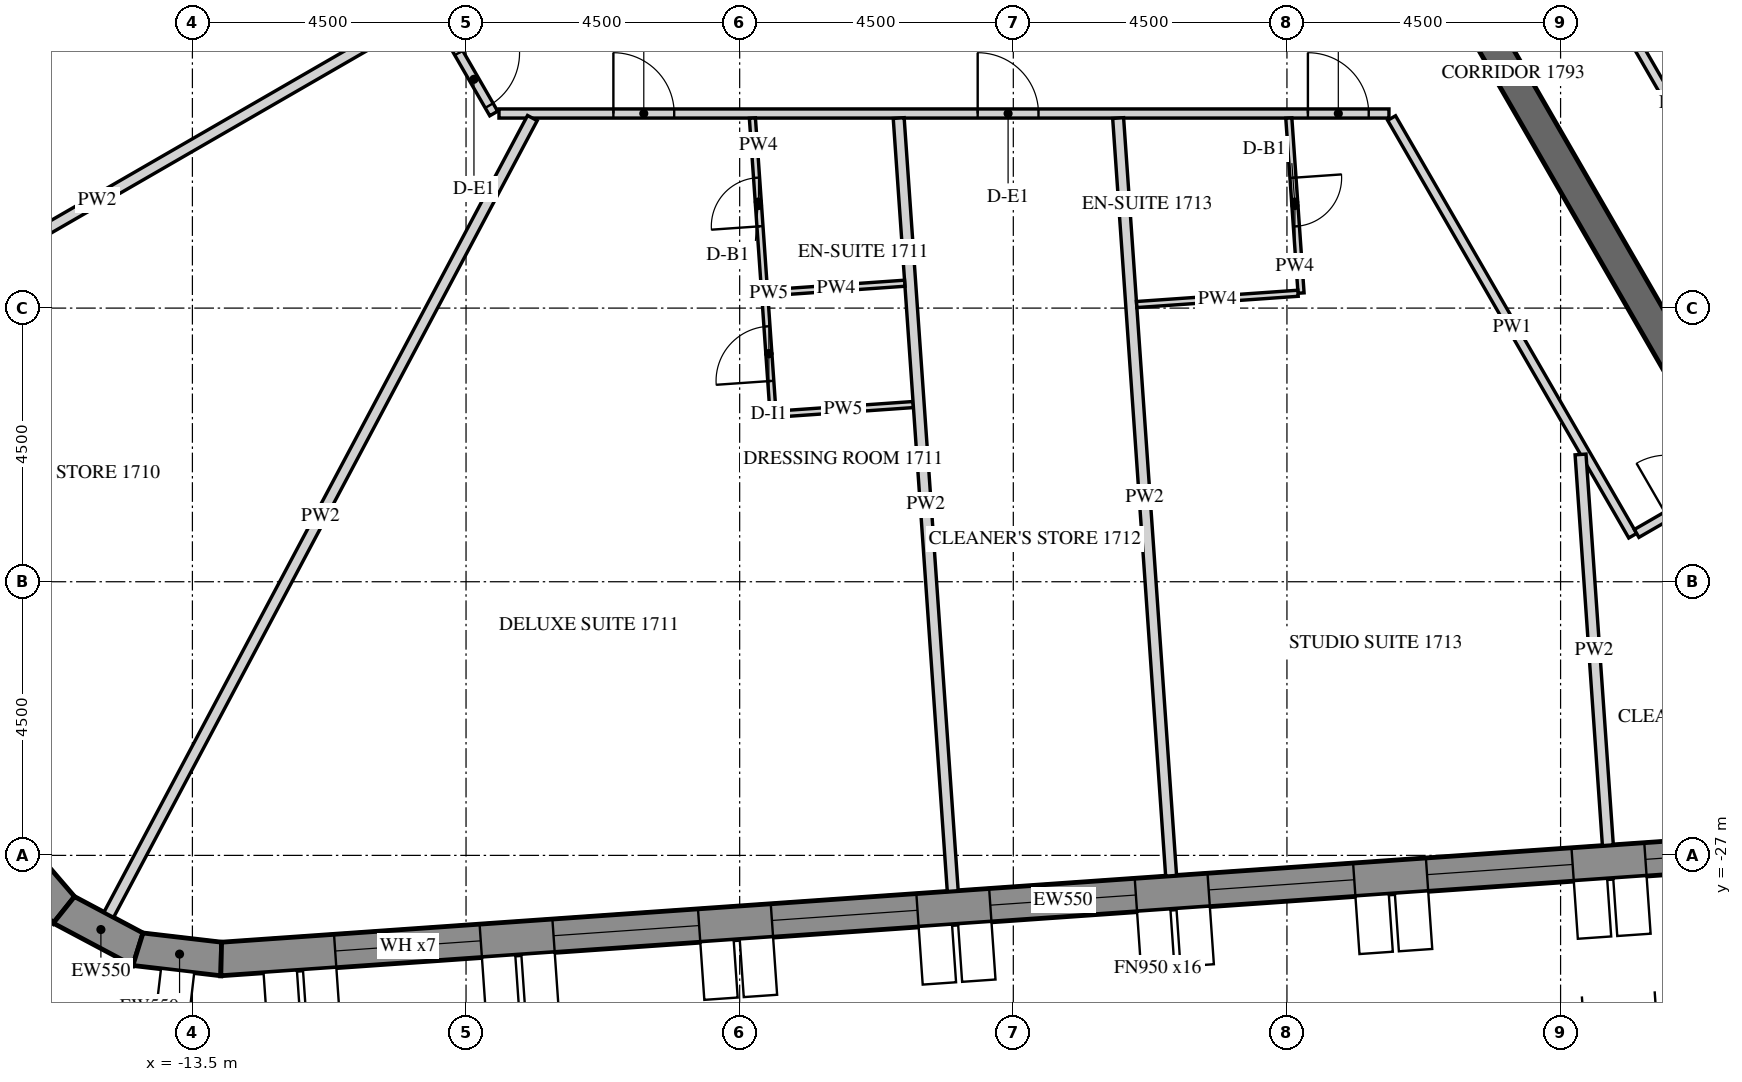
"""IFC4 building model, lengths in metres.
Left out: names, types, materials, properties, quantities, classifications, styles, units other than length and angle.
Written with IfcOpenShell. Run it as: python <this file> out.ifc"""

import sys

from ifc_helpers import new_model, si_unit, direction, frame, frame_2d, origin, place, context, subcontext, project, spatial, polyline, rectangle, outline, extrude, element, fill, save


model = new_model("IFC4")
c1 = context("Model", 3, precision=1e-05, world=origin(), true_north=direction((0.0, 1.0)))
c2 = subcontext(c1, "Body", "Model", "MODEL_VIEW")
j1 = project(units=[si_unit("LENGTHUNIT", "METRE"), si_unit("PLANEANGLEUNIT", "RADIAN")], contexts=[c1])
p1 = place(None, origin())
s1 = spatial("IfcSite", under=j1, at=p1, CompositionType="ELEMENT")
p2 = place(p1, origin())
s2 = spatial("IfcBuilding", under=s1, at=p2, CompositionType="ELEMENT")
p3 = place(p2, frame((0.0, 0.0, 215.1)))
s3 = spatial("IfcBuildingStorey", under=s2, at=p3, CompositionType="ELEMENT", Elevation=215.1)
p4 = place(p3, frame((-16.512, -26.85, -0.15), z_axis=(0.0, 0.0, 1.0), x_axis=(0.651621950847, -0.758543890078, 0.0)))
e1 = element("IfcWall", 1, at=p4, inside=s3, PredefinedType="SOLIDWALL", context=c2, shape_type="SweptSolid", body=[
    extrude(outline(polyline([(-0.026, -0.275), (1.431, -0.275), (1.327, 0.275), (0.026, 0.275), (-0.026, -0.275)])), origin(), (0.0, 0.0, 1.0), 3.9),
])
p5 = place(p3, frame((-15.614, -27.896, -0.15), z_axis=(0.0, 0.0, 1.0), x_axis=(0.882994189209, -0.469383917304, 0.0)))
e2 = element("IfcWall", 2, at=p5, inside=s3, PredefinedType="SOLIDWALL", context=c2, shape_type="SweptSolid", body=[
    extrude(outline(polyline([(-0.052, -0.275), (1.431, -0.275), (1.327, 0.275), (0.052, 0.275), (-0.052, -0.275)])), origin(), (0.0, 0.0, 1.0), 3.9),
])
p6 = place(p3, frame((-14.396, -28.543, -0.15), z_axis=(0.0, 0.0, 1.0), x_axis=(0.993232537394, -0.11614269956, 0.0)))
e3 = element("IfcWall", 3, at=p6, inside=s3, PredefinedType="SOLIDWALL", context=c2, shape_type="SweptSolid", body=[
    extrude(outline(polyline([(-0.052, -0.275), (1.405, -0.275), (1.353, 0.275), (0.052, 0.275), (-0.052, -0.275)])), origin(), (0.0, 0.0, 1.0), 3.9),
])
p7 = place(p3, frame((-13.026, -28.704, -0.15), z_axis=(0.0, 0.0, 1.0), x_axis=(0.99756406806, 0.069756219185, 0.0)))
e4 = element("IfcWall", 4, at=p7, inside=s3, PredefinedType="SOLIDWALL", context=c2, shape_type="SweptSolid", body=[
    extrude(outline(polyline([(-0.026, -0.275), (27.78, -0.275), (27.735, 0.275), (0.026, 0.275), (-0.026, -0.275)])), origin(), (0.0, 0.0, 1.0), 3.9),
])
p8 = place(p7, frame((1.879, 0.0, 1.05)))
e5 = element("IfcOpeningElement", 5, at=p8, cuts=e4, PredefinedType="OPENING", context=c2, shape_type="SweptSolid", body=[
    extrude(rectangle(XDim=2.4, YDim=2.4, at=frame_2d((1.2, 1.2))), frame((0.0, 0.285, 0.0), z_axis=(0.0, -1.0, 0.0), x_axis=(1.0, 0.0, 0.0)), (0.0, 0.0, 1.0), 0.57),
])
p9 = place(p7, frame((5.479, 0.0, 1.05)))
e6 = element("IfcOpeningElement", 6, at=p9, cuts=e4, PredefinedType="OPENING", context=c2, shape_type="SweptSolid", body=[
    extrude(rectangle(XDim=2.4, YDim=2.4, at=frame_2d((1.2, 1.2))), frame((0.0, 0.285, 0.0), z_axis=(0.0, -1.0, 0.0), x_axis=(1.0, 0.0, 0.0)), (0.0, 0.0, 1.0), 0.57),
])
p10 = place(p7, frame((9.079, 0.0, 1.05)))
e7 = element("IfcOpeningElement", 7, at=p10, cuts=e4, PredefinedType="OPENING", context=c2, shape_type="SweptSolid", body=[
    extrude(rectangle(XDim=2.4, YDim=2.4, at=frame_2d((1.2, 1.2))), frame((0.0, 0.285, 0.0), z_axis=(0.0, -1.0, 0.0), x_axis=(1.0, 0.0, 0.0)), (0.0, 0.0, 1.0), 0.57),
])
p11 = place(p7, frame((12.679, 0.0, 1.05)))
e8 = element("IfcOpeningElement", 8, at=p11, cuts=e4, PredefinedType="OPENING", context=c2, shape_type="SweptSolid", body=[
    extrude(rectangle(XDim=2.4, YDim=2.4, at=frame_2d((1.2, 1.2))), frame((0.0, 0.285, 0.0), z_axis=(0.0, -1.0, 0.0), x_axis=(1.0, 0.0, 0.0)), (0.0, 0.0, 1.0), 0.57),
])
p12 = place(p7, frame((16.279, 0.0, 1.05)))
e9 = element("IfcOpeningElement", 9, at=p12, cuts=e4, PredefinedType="OPENING", context=c2, shape_type="SweptSolid", body=[
    extrude(rectangle(XDim=2.4, YDim=2.4, at=frame_2d((1.2, 1.2))), frame((0.0, 0.285, 0.0), z_axis=(0.0, -1.0, 0.0), x_axis=(1.0, 0.0, 0.0)), (0.0, 0.0, 1.0), 0.57),
])
p13 = place(p7, frame((19.879, 0.0, 1.05)))
e10 = element("IfcOpeningElement", 10, at=p13, cuts=e4, PredefinedType="OPENING", context=c2, shape_type="SweptSolid", body=[
    extrude(rectangle(XDim=2.4, YDim=2.4, at=frame_2d((1.2, 1.2))), frame((0.0, 0.285, 0.0), z_axis=(0.0, -1.0, 0.0), x_axis=(1.0, 0.0, 0.0)), (0.0, 0.0, 1.0), 0.57),
])
p14 = place(p7, frame((23.479, 0.0, 1.05)))
e11 = element("IfcOpeningElement", 11, at=p14, cuts=e4, PredefinedType="OPENING", context=c2, shape_type="SweptSolid", body=[
    extrude(rectangle(XDim=2.4, YDim=2.4, at=frame_2d((1.2, 1.2))), frame((0.0, 0.285, 0.0), z_axis=(0.0, -1.0, 0.0), x_axis=(1.0, 0.0, 0.0)), (0.0, 0.0, 1.0), 0.57),
])
p15 = place(p3, frame((7.506, -13.0, -0.15), z_axis=(0.0, 0.0, 1.0), x_axis=(0.499988271576, -0.866032175087, 0.0)))
e12 = element("IfcWall", 12, at=p15, inside=s3, PredefinedType="SHEAR", context=c2, shape_type="SweptSolid", body=[
    extrude(rectangle(XDim=15.424, YDim=0.5, at=frame_2d((7.712, 0.0))), origin(), (0.0, 0.0, 1.0), 3.9),
])
p16 = place(p15, frame((6.812, 0.0, 0.15)))
e13 = element("IfcOpeningElement", 13, at=p16, cuts=e12, PredefinedType="OPENING", context=c2, shape_type="SweptSolid", body=[
    extrude(rectangle(XDim=1.8, YDim=2.4, at=frame_2d((0.9, 1.2))), frame((0.0, 0.26, 0.0), z_axis=(0.0, -1.0, 0.0), x_axis=(1.0, 0.0, 0.0)), (0.0, 0.0, 1.0), 0.52),
])
p17 = place(p3, frame((-15.863, -2.125, 0.0), z_axis=(0.0, 0.0, 1.0), x_axis=(0.500008833422, -0.866020303746, 0.0)))
e14 = element("IfcWall", 14, at=p17, inside=s3, PredefinedType="PARTITIONING", context=c2, shape_type="SweptSolid", body=[
    extrude(rectangle(XDim=14.636, YDim=0.15, at=frame_2d((7.318, 0.0))), origin(), (0.0, 0.0, 1.0), 2.988),
])
p18 = place(p17, frame((4.909, 0.0, 0.0)))
e15 = element("IfcOpeningElement", 15, at=p18, cuts=e14, PredefinedType="OPENING", context=c2, shape_type="SweptSolid", body=[
    extrude(rectangle(XDim=1.0, YDim=2.1, at=frame_2d((0.5, 1.05))), frame((0.0, 0.085, 0.0), z_axis=(0.0, -1.0, 0.0), x_axis=(1.0, 0.0, 0.0)), (0.0, 0.0, 1.0), 0.17),
])
p19 = place(p17, frame((13.486, 0.0, 0.0)))
e16 = element("IfcOpeningElement", 16, at=p19, cuts=e14, PredefinedType="OPENING", context=c2, shape_type="SweptSolid", body=[
    extrude(rectangle(XDim=1.0, YDim=2.1, at=frame_2d((0.5, 1.05))), frame((0.0, 0.085, 0.0), z_axis=(0.0, -1.0, 0.0), x_axis=(1.0, 0.0, 0.0)), (0.0, 0.0, 1.0), 0.17),
])
p20 = place(p3, frame((-8.458, -14.8, 0.0), z_axis=(0.0, 0.0, 1.0), x_axis=(1.0, 0.0, 0.0)))
e17 = element("IfcWall", 17, at=p20, inside=s3, PredefinedType="PARTITIONING", context=c2, shape_type="SweptSolid", body=[
    extrude(rectangle(XDim=14.636, YDim=0.15, at=frame_2d((7.318, 0.0))), origin(), (0.0, 0.0, 1.0), 2.988),
])
p21 = place(p20, frame((1.881, 0.0, 0.0)))
e18 = element("IfcOpeningElement", 18, at=p21, cuts=e17, PredefinedType="OPENING", context=c2, shape_type="SweptSolid", body=[
    extrude(rectangle(XDim=1.0, YDim=2.1, at=frame_2d((0.5, 1.05))), frame((0.0, 0.085, 0.0), z_axis=(0.0, -1.0, 0.0), x_axis=(1.0, 0.0, 0.0)), (0.0, 0.0, 1.0), 0.17),
])
p22 = place(p20, frame((7.872, 0.0, 0.0)))
e19 = element("IfcOpeningElement", 19, at=p22, cuts=e17, PredefinedType="OPENING", context=c2, shape_type="SweptSolid", body=[
    extrude(rectangle(XDim=1.0, YDim=2.1, at=frame_2d((0.5, 1.05))), frame((0.0, 0.085, 0.0), z_axis=(0.0, -1.0, 0.0), x_axis=(1.0, 0.0, 0.0)), (0.0, 0.0, 1.0), 0.17),
])
p23 = place(p20, frame((13.303, 0.0, 0.0)))
e20 = element("IfcOpeningElement", 20, at=p23, cuts=e17, PredefinedType="OPENING", context=c2, shape_type="SweptSolid", body=[
    extrude(rectangle(XDim=1.0, YDim=2.1, at=frame_2d((0.5, 1.05))), frame((0.0, 0.085, 0.0), z_axis=(0.0, -1.0, 0.0), x_axis=(1.0, 0.0, 0.0)), (0.0, 0.0, 1.0), 0.17),
])
p24 = place(p3, frame((6.221, -14.875, 0.0), z_axis=(0.0, 0.0, 1.0), x_axis=(0.499989830942, -0.866031274813, 0.0)))
e21 = element("IfcWall", 21, at=p24, inside=s3, PredefinedType="PARTITIONING", context=c2, shape_type="SweptSolid", body=[
    extrude(rectangle(XDim=7.93, YDim=0.15, at=frame_2d((3.965, 0.0))), origin(), (0.0, 0.0, 1.0), 2.988),
])
p25 = place(p3, frame((10.251, -21.705, 0.0), z_axis=(0.0, 0.0, 1.0), x_axis=(0.866013532718, 0.500020560727, 0.0)))
e22 = element("IfcWall", 22, at=p25, inside=s3, PredefinedType="PARTITIONING", context=c2, shape_type="SweptSolid", body=[
    extrude(rectangle(XDim=1.725, YDim=0.15, at=frame_2d((0.863, 0.0))), origin(), (0.0, 0.0, 1.0), 2.988),
])
p26 = place(p25, frame((0.575, 0.0, 0.0)))
e23 = element("IfcOpeningElement", 23, at=p26, cuts=e22, PredefinedType="OPENING", context=c2, shape_type="SweptSolid", body=[
    extrude(rectangle(XDim=1.0, YDim=2.1, at=frame_2d((0.5, 1.05))), frame((0.0, 0.085, 0.0), z_axis=(0.0, -1.0, 0.0), x_axis=(1.0, 0.0, 0.0)), (0.0, 0.0, 1.0), 0.17),
])
p27 = place(p3, frame((13.699, -19.628, 0.0), z_axis=(0.0, 0.0, 1.0), x_axis=(-0.499997422768, 0.866026891745, 0.0)))
e24 = element("IfcWall", 24, at=p27, inside=s3, PredefinedType="PARTITIONING", context=c2, shape_type="SweptSolid", body=[
    extrude(rectangle(XDim=7.942, YDim=0.15, at=frame_2d((3.971, 0.0))), origin(), (0.0, 0.0, 1.0), 2.988),
])
p28 = place(p3, frame((-20.513, -19.37, 0.0), z_axis=(0.0, 0.0, 1.0), x_axis=(0.866019402111, 0.500010395058, 0.0)))
e25 = element("IfcWall", 25, at=p28, inside=s3, PredefinedType="PARTITIONING", context=c2, shape_type="SweptSolid", body=[
    extrude(rectangle(XDim=12.575, YDim=0.18, at=frame_2d((6.288, 0.0))), origin(), (0.0, 0.0, 1.0), 2.988),
])
p29 = place(p3, frame((-14.876, -27.977, 0.0), z_axis=(0.0, 0.0, 1.0), x_axis=(0.469475175214, 0.882945672088, 0.0)))
e26 = element("IfcWall", 26, at=p29, inside=s3, PredefinedType="PARTITIONING", context=c2, shape_type="SweptSolid", body=[
    extrude(rectangle(XDim=14.839, YDim=0.18, at=frame_2d((7.419, 0.0))), origin(), (0.0, 0.0, 1.0), 2.988),
])
p30 = place(p3, frame((-4.09, -17.752, 0.0), z_axis=(0.0, 0.0, 1.0), x_axis=(-0.06975499513, 0.997564153654, 0.0)))
e27 = element("IfcWall", 27, at=p30, inside=s3, PredefinedType="PARTITIONING", context=c2, shape_type="SweptSolid", body=[
    extrude(rectangle(XDim=2.884, YDim=0.1, at=frame_2d((1.442, 0.0))), origin(), (0.0, 0.0, 1.0), 2.988),
])
p31 = place(p30, frame((1.1, 0.0, 0.0)))
e28 = element("IfcOpeningElement", 28, at=p31, cuts=e27, PredefinedType="OPENING", context=c2, shape_type="SweptSolid", body=[
    extrude(rectangle(XDim=0.8, YDim=2.1, at=frame_2d((0.4, 1.05))), frame((0.0, 0.06, 0.0), z_axis=(0.0, -1.0, 0.0), x_axis=(1.0, 0.0, 0.0)), (0.0, 0.0, 1.0), 0.12),
])
p32 = place(p3, frame((-1.646, -19.586, 0.0), z_axis=(0.0, 0.0, 1.0), x_axis=(-0.997564338377, -0.069752353356, 0.0)))
e29 = element("IfcWall", 29, at=p32, inside=s3, PredefinedType="PARTITIONING", context=c2, shape_type="SweptSolid", body=[
    extrude(rectangle(XDim=2.31, YDim=0.1, at=frame_2d((1.155, 0.0))), origin(), (0.0, 0.0, 1.0), 2.988),
])
p33 = place(p3, frame((-3.954, -19.697, 0.0), z_axis=(0.0, 0.0, 1.0), x_axis=(-0.069776698601, 0.997562635794, 0.0)))
e30 = element("IfcWall", 30, at=p33, inside=s3, PredefinedType="PARTITIONING", context=c2, shape_type="SweptSolid", body=[
    extrude(rectangle(XDim=1.9, YDim=0.1, at=frame_2d((0.95, 0.0))), origin(), (0.0, 0.0, 1.0), 2.988),
])
p34 = place(p33, frame((0.5, 0.0, 0.0)))
e31 = element("IfcOpeningElement", 31, at=p34, cuts=e30, PredefinedType="OPENING", context=c2, shape_type="SweptSolid", body=[
    extrude(rectangle(XDim=0.9, YDim=2.1, at=frame_2d((0.45, 1.05))), frame((0.0, 0.06, 0.0), z_axis=(0.0, -1.0, 0.0), x_axis=(1.0, 0.0, 0.0)), (0.0, 0.0, 1.0), 0.12),
])
p35 = place(p3, frame((-0.996, -27.587, 0.0), z_axis=(0.0, 0.0, 1.0), x_axis=(-0.069758774678, 0.99756388936, 0.0)))
e32 = element("IfcWall", 32, at=p35, inside=s3, PredefinedType="PARTITIONING", context=c2, shape_type="SweptSolid", body=[
    extrude(rectangle(XDim=12.743, YDim=0.18, at=frame_2d((6.371, 0.0))), origin(), (0.0, 0.0, 1.0), 2.988),
])
p36 = place(p3, frame((-4.04, -17.749, 0.0), z_axis=(0.0, 0.0, 1.0), x_axis=(0.997562351999, 0.069780755754, 0.0)))
e33 = element("IfcWall", 33, at=p36, inside=s3, PredefinedType="PARTITIONING", context=c2, shape_type="SweptSolid", body=[
    extrude(rectangle(XDim=2.26, YDim=0.1, at=frame_2d((1.13, 0.0))), origin(), (0.0, 0.0, 1.0), 2.988),
])
p37 = place(p3, frame((2.595, -27.335, 0.0), z_axis=(0.0, 0.0, 1.0), x_axis=(-0.069757939761, 0.997563947745, 0.0)))
e34 = element("IfcWall", 34, at=p37, inside=s3, PredefinedType="PARTITIONING", context=c2, shape_type="SweptSolid", body=[
    extrude(rectangle(XDim=12.491, YDim=0.18, at=frame_2d((6.246, 0.0))), origin(), (0.0, 0.0, 1.0), 2.988),
])
p38 = place(p3, frame((4.531, -14.875, 0.0), z_axis=(0.0, 0.0, 1.0), x_axis=(0.069743215787, -0.997564977258, 0.0)))
e35 = element("IfcWall", 35, at=p38, inside=s3, PredefinedType="PARTITIONING", context=c2, shape_type="SweptSolid", body=[
    extrude(rectangle(XDim=2.885, YDim=0.1, at=frame_2d((1.442, 0.0))), origin(), (0.0, 0.0, 1.0), 2.988),
])
p39 = place(p38, frame((0.985, 0.0, 0.0)))
e36 = element("IfcOpeningElement", 36, at=p39, cuts=e35, PredefinedType="OPENING", context=c2, shape_type="SweptSolid", body=[
    extrude(rectangle(XDim=0.8, YDim=2.1, at=frame_2d((0.4, 1.05))), frame((0.0, 0.06, 0.0), z_axis=(0.0, -1.0, 0.0), x_axis=(1.0, 0.0, 0.0)), (0.0, 0.0, 1.0), 0.12),
])
p40 = place(p3, frame((4.682, -17.756, 0.0), z_axis=(0.0, 0.0, 1.0), x_axis=(-0.997564270717, -0.069753320981, 0.0)))
e37 = element("IfcWall", 37, at=p40, inside=s3, PredefinedType="PARTITIONING", context=c2, shape_type="SweptSolid", body=[
    extrude(rectangle(XDim=2.66, YDim=0.1, at=frame_2d((1.33, 0.0))), origin(), (0.0, 0.0, 1.0), 2.988),
])
p41 = place(p3, frame((9.778, -26.833, 0.0), z_axis=(0.0, 0.0, 1.0), x_axis=(-0.069733334443, 0.997565668048, 0.0)))
e38 = element("IfcWall", 38, at=p41, inside=s3, PredefinedType="PARTITIONING", context=c2, shape_type="SweptSolid", body=[
    extrude(rectangle(XDim=6.442, YDim=0.18, at=frame_2d((3.221, 0.0))), origin(), (0.0, 0.0, 1.0), 2.988),
])
p42 = place(p3, frame((12.283, -14.225, 0.0), z_axis=(0.0, 0.0, 1.0), x_axis=(-0.866018616679, 0.500011755427, 0.0)))
e39 = element("IfcWall", 39, at=p42, inside=s3, PredefinedType="PARTITIONING", context=c2, shape_type="SweptSolid", body=[
    extrude(rectangle(XDim=2.8, YDim=0.1, at=frame_2d((1.4, 0.0))), origin(), (0.0, 0.0, 1.0), 2.988),
])
p43 = place(p8, frame((0.0, 0.205, 0.0)))
e40 = element("IfcWindow", 40, at=p43, inside=s3, PartitioningType="DOUBLE_PANEL_VERTICAL", PredefinedType="WINDOW", context=c2, shape_type="SweptSolid", body=[
    extrude(rectangle(XDim=2.4, YDim=2.4, at=frame_2d((1.2, 1.2))), frame((0.0, 0.03, 0.0), z_axis=(0.0, -1.0, 0.0), x_axis=(1.0, 0.0, 0.0)), (0.0, 0.0, 1.0), 0.06),
])
fill(e5, e40)
p44 = place(p9, frame((0.0, 0.205, 0.0)))
e41 = element("IfcWindow", 41, at=p44, inside=s3, PartitioningType="DOUBLE_PANEL_VERTICAL", PredefinedType="WINDOW", context=c2, shape_type="SweptSolid", body=[
    extrude(rectangle(XDim=2.4, YDim=2.4, at=frame_2d((1.2, 1.2))), frame((0.0, 0.03, 0.0), z_axis=(0.0, -1.0, 0.0), x_axis=(1.0, 0.0, 0.0)), (0.0, 0.0, 1.0), 0.06),
])
fill(e6, e41)
p45 = place(p10, frame((0.0, 0.205, 0.0)))
e42 = element("IfcWindow", 42, at=p45, inside=s3, PartitioningType="DOUBLE_PANEL_VERTICAL", PredefinedType="WINDOW", context=c2, shape_type="SweptSolid", body=[
    extrude(rectangle(XDim=2.4, YDim=2.4, at=frame_2d((1.2, 1.2))), frame((0.0, 0.03, 0.0), z_axis=(0.0, -1.0, 0.0), x_axis=(1.0, 0.0, 0.0)), (0.0, 0.0, 1.0), 0.06),
])
fill(e7, e42)
p46 = place(p11, frame((0.0, 0.205, 0.0)))
e43 = element("IfcWindow", 43, at=p46, inside=s3, PartitioningType="DOUBLE_PANEL_VERTICAL", PredefinedType="WINDOW", context=c2, shape_type="SweptSolid", body=[
    extrude(rectangle(XDim=2.4, YDim=2.4, at=frame_2d((1.2, 1.2))), frame((0.0, 0.03, 0.0), z_axis=(0.0, -1.0, 0.0), x_axis=(1.0, 0.0, 0.0)), (0.0, 0.0, 1.0), 0.06),
])
fill(e8, e43)
p47 = place(p12, frame((0.0, 0.205, 0.0)))
e44 = element("IfcWindow", 44, at=p47, inside=s3, PartitioningType="DOUBLE_PANEL_VERTICAL", PredefinedType="WINDOW", context=c2, shape_type="SweptSolid", body=[
    extrude(rectangle(XDim=2.4, YDim=2.4, at=frame_2d((1.2, 1.2))), frame((0.0, 0.03, 0.0), z_axis=(0.0, -1.0, 0.0), x_axis=(1.0, 0.0, 0.0)), (0.0, 0.0, 1.0), 0.06),
])
fill(e9, e44)
p48 = place(p13, frame((0.0, 0.205, 0.0)))
e45 = element("IfcWindow", 45, at=p48, inside=s3, PartitioningType="DOUBLE_PANEL_VERTICAL", PredefinedType="WINDOW", context=c2, shape_type="SweptSolid", body=[
    extrude(rectangle(XDim=2.4, YDim=2.4, at=frame_2d((1.2, 1.2))), frame((0.0, 0.03, 0.0), z_axis=(0.0, -1.0, 0.0), x_axis=(1.0, 0.0, 0.0)), (0.0, 0.0, 1.0), 0.06),
])
fill(e10, e45)
p49 = place(p14, frame((0.0, 0.205, 0.0)))
e46 = element("IfcWindow", 46, at=p49, inside=s3, PartitioningType="DOUBLE_PANEL_VERTICAL", PredefinedType="WINDOW", context=c2, shape_type="SweptSolid", body=[
    extrude(rectangle(XDim=2.4, YDim=2.4, at=frame_2d((1.2, 1.2))), frame((0.0, 0.03, 0.0), z_axis=(0.0, -1.0, 0.0), x_axis=(1.0, 0.0, 0.0)), (0.0, 0.0, 1.0), 0.06),
])
fill(e11, e46)
p50 = place(p19, origin())
e47 = element("IfcDoor", 47, at=p50, inside=s3, OperationType="SINGLE_SWING_LEFT", PredefinedType="DOOR", context=c2, shape_type="SweptSolid", body=[
    extrude(rectangle(XDim=1.0, YDim=2.1, at=frame_2d((0.5, 1.05))), frame((0.0, 0.025, 0.0), z_axis=(0.0, -1.0, 0.0), x_axis=(1.0, 0.0, 0.0)), (0.0, 0.0, 1.0), 0.05),
])
fill(e16, e47)
p51 = place(p21, origin())
e48 = element("IfcDoor", 48, at=p51, inside=s3, OperationType="SINGLE_SWING_LEFT", PredefinedType="DOOR", context=c2, shape_type="SweptSolid", body=[
    extrude(rectangle(XDim=1.0, YDim=2.1, at=frame_2d((0.5, 1.05))), frame((0.0, 0.025, 0.0), z_axis=(0.0, -1.0, 0.0), x_axis=(1.0, 0.0, 0.0)), (0.0, 0.0, 1.0), 0.05),
])
fill(e18, e48)
p52 = place(p31, origin())
e49 = element("IfcDoor", 49, at=p52, inside=s3, OperationType="SINGLE_SWING_LEFT", PredefinedType="DOOR", context=c2, shape_type="SweptSolid", body=[
    extrude(rectangle(XDim=0.8, YDim=2.1, at=frame_2d((0.4, 1.05))), frame((0.0, 0.025, 0.0), z_axis=(0.0, -1.0, 0.0), x_axis=(1.0, 0.0, 0.0)), (0.0, 0.0, 1.0), 0.05),
])
fill(e28, e49)
p53 = place(p34, origin())
e50 = element("IfcDoor", 50, at=p53, inside=s3, OperationType="SINGLE_SWING_RIGHT", PredefinedType="DOOR", context=c2, shape_type="SweptSolid", body=[
    extrude(rectangle(XDim=0.9, YDim=2.1, at=frame_2d((0.45, 1.05))), frame((0.0, 0.025, 0.0), z_axis=(0.0, -1.0, 0.0), x_axis=(1.0, 0.0, 0.0)), (0.0, 0.0, 1.0), 0.05),
])
fill(e31, e50)
p54 = place(p22, origin())
e51 = element("IfcDoor", 51, at=p54, inside=s3, OperationType="SINGLE_SWING_RIGHT", PredefinedType="DOOR", context=c2, shape_type="SweptSolid", body=[
    extrude(rectangle(XDim=1.0, YDim=2.1, at=frame_2d((0.5, 1.05))), frame((0.0, 0.025, 0.0), z_axis=(0.0, -1.0, 0.0), x_axis=(1.0, 0.0, 0.0)), (0.0, 0.0, 1.0), 0.05),
])
fill(e19, e51)
p55 = place(p23, origin())
e52 = element("IfcDoor", 52, at=p55, inside=s3, OperationType="SINGLE_SWING_RIGHT", PredefinedType="DOOR", context=c2, shape_type="SweptSolid", body=[
    extrude(rectangle(XDim=1.0, YDim=2.1, at=frame_2d((0.5, 1.05))), frame((0.0, 0.025, 0.0), z_axis=(0.0, -1.0, 0.0), x_axis=(1.0, 0.0, 0.0)), (0.0, 0.0, 1.0), 0.05),
])
fill(e20, e52)
p56 = place(p39, origin())
e53 = element("IfcDoor", 53, at=p56, inside=s3, OperationType="SINGLE_SWING_RIGHT", PredefinedType="DOOR", context=c2, shape_type="SweptSolid", body=[
    extrude(rectangle(XDim=0.8, YDim=2.1, at=frame_2d((0.4, 1.05))), frame((0.0, 0.025, 0.0), z_axis=(0.0, -1.0, 0.0), x_axis=(1.0, 0.0, 0.0)), (0.0, 0.0, 1.0), 0.05),
])
fill(e36, e53)
save(model, sys.argv[1])
